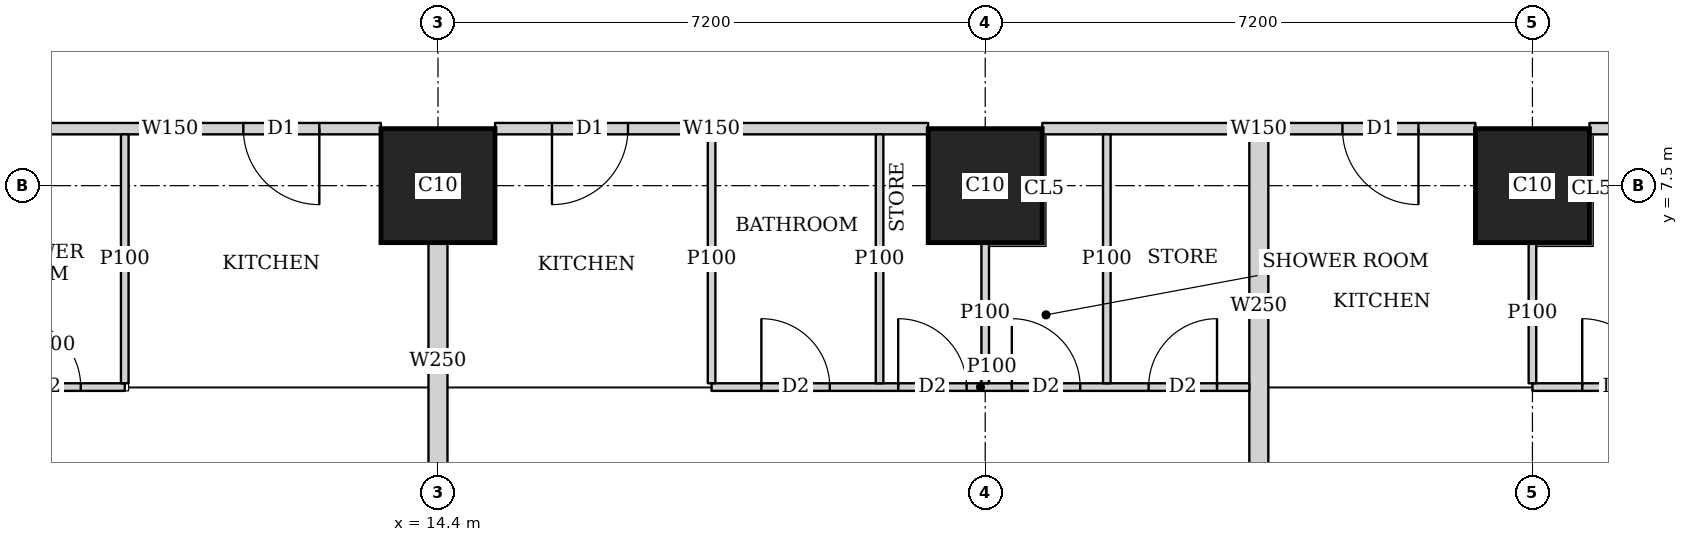
"""IFC4 building model, lengths in metres.
Left out: names, types, materials, properties, quantities, classifications, styles, units other than length and angle.
Written with IfcOpenShell. Run it as: python <this file> out.ifc"""

import sys

from ifc_helpers import new_model, si_unit, direction, frame, frame_2d, origin, origin_2d, place, context, subcontext, project, spatial, rectangle, extrude, element, fill, save


model = new_model("IFC4")
c1 = context("Model", 3, precision=1e-05, world=origin(), true_north=direction((0.0, 1.0)))
c2 = subcontext(c1, "Body", "Model", "MODEL_VIEW")
j1 = project(units=[si_unit("LENGTHUNIT", "METRE"), si_unit("PLANEANGLEUNIT", "RADIAN")], contexts=[c1])
p1 = place(None, origin())
s1 = spatial("IfcSite", under=j1, at=p1, CompositionType="ELEMENT")
p2 = place(p1, origin())
s2 = spatial("IfcBuilding", under=s1, at=p2, CompositionType="ELEMENT")
p3 = place(p2, frame((0.0, 0.0, 147.05)))
s3 = spatial("IfcBuildingStorey", under=s2, at=p3, CompositionType="ELEMENT", Elevation=147.05)
for number, where, z_axis, x_axis in (
    (1, (14.4, 7.5, 0.0), (0.0, 0.0, 1.0), (1.0, 0.0, 0.0)),
    (2, (21.6, 7.5, 0.0), (0.0, 0.0, 1.0), (1.0, 0.0, 0.0)),
    (3, (28.8, 7.5, 0.0), (0.0, 0.0, 1.0), (1.0, 0.0, 0.0)),
):
    element("IfcColumn", number, at=place(p3, frame(where, z_axis=z_axis, x_axis=x_axis)), inside=s3, PredefinedType="COLUMN", context=c2, shape_type="SweptSolid", body=[
        extrude(rectangle(XDim=1.5, YDim=1.5, at=origin_2d()), origin(), (0.0, 0.0, 1.0), 3.75),
    ])
p4 = place(p3, frame((35.249, 8.25, 0.0), z_axis=(0.0, 0.0, 1.0), x_axis=(-1.0, 0.0, 0.0)))
e4 = element("IfcWall", 4, at=p4, inside=s3, PredefinedType="SOLIDWALL", context=c2, shape_type="SweptSolid", body=[
    extrude(rectangle(XDim=5.698, YDim=0.15, at=frame_2d((2.849, 0.0))), origin(), (0.0, 0.0, 1.0), 3.5),
])
p5 = place(p3, frame((28.049, 8.25, 0.0), z_axis=(0.0, 0.0, 1.0), x_axis=(-1.0, 0.0, 0.0)))
e5 = element("IfcWall", 5, at=p5, inside=s3, PredefinedType="SOLIDWALL", context=c2, shape_type="SweptSolid", body=[
    extrude(rectangle(XDim=5.698, YDim=0.15, at=frame_2d((2.849, 0.0))), origin(), (0.0, 0.0, 1.0), 3.5),
])
p6 = place(p5, frame((0.749, 0.0, 0.0)))
e6 = element("IfcOpeningElement", 6, at=p6, cuts=e5, PredefinedType="OPENING", context=c2, shape_type="SweptSolid", body=[
    extrude(rectangle(XDim=1.0, YDim=2.1, at=frame_2d((0.5, 1.05))), frame((0.0, 0.085, 0.0), z_axis=(0.0, -1.0, 0.0), x_axis=(1.0, 0.0, 0.0)), (0.0, 0.0, 1.0), 0.17),
])
p7 = place(p3, frame((20.849, 8.25, 0.0), z_axis=(0.0, 0.0, 1.0), x_axis=(-1.0, 0.0, 0.0)))
e7 = element("IfcWall", 7, at=p7, inside=s3, PredefinedType="SOLIDWALL", context=c2, shape_type="SweptSolid", body=[
    extrude(rectangle(XDim=5.698, YDim=0.15, at=frame_2d((2.849, 0.0))), origin(), (0.0, 0.0, 1.0), 3.5),
])
p8 = place(p7, frame((3.949, 0.0, 0.0)))
e8 = element("IfcOpeningElement", 8, at=p8, cuts=e7, PredefinedType="OPENING", context=c2, shape_type="SweptSolid", body=[
    extrude(rectangle(XDim=1.0, YDim=2.1, at=frame_2d((0.5, 1.05))), frame((0.0, 0.085, 0.0), z_axis=(0.0, -1.0, 0.0), x_axis=(1.0, 0.0, 0.0)), (0.0, 0.0, 1.0), 0.17),
])
p9 = place(p3, frame((13.649, 8.25, 0.0), z_axis=(0.0, 0.0, 1.0), x_axis=(-1.0, 0.0, 0.0)))
e9 = element("IfcWall", 9, at=p9, inside=s3, PredefinedType="SOLIDWALL", context=c2, shape_type="SweptSolid", body=[
    extrude(rectangle(XDim=5.549, YDim=0.15, at=frame_2d((2.774, 0.0))), origin(), (0.0, 0.0, 1.0), 3.5),
])
p10 = place(p9, frame((0.81, 0.0, 0.0)))
e10 = element("IfcOpeningElement", 10, at=p10, cuts=e9, PredefinedType="OPENING", context=c2, shape_type="SweptSolid", body=[
    extrude(rectangle(XDim=1.0, YDim=2.1, at=frame_2d((0.5, 1.05))), frame((0.0, 0.085, 0.0), z_axis=(0.0, -1.0, 0.0), x_axis=(1.0, 0.0, 0.0)), (0.0, 0.0, 1.0), 0.17),
])
p11 = place(p3, frame((10.279, 4.85, 0.0), z_axis=(0.0, 0.0, 1.0), x_axis=(-1.0, 0.0, 0.0)))
e11 = element("IfcWall", 11, at=p11, inside=s3, PredefinedType="PARTITIONING", context=c2, shape_type="SweptSolid", body=[
    extrude(rectangle(XDim=1.954, YDim=0.1, at=frame_2d((0.977, 0.0))), origin(), (0.0, 0.0, 1.0), 3.5),
])
p12 = place(p11, frame((0.579, 0.0, 0.0)))
e12 = element("IfcOpeningElement", 12, at=p12, cuts=e11, PredefinedType="OPENING", context=c2, shape_type="SweptSolid", body=[
    extrude(rectangle(XDim=0.9, YDim=2.1, at=frame_2d((0.45, 1.05))), frame((0.0, 0.06, 0.0), z_axis=(0.0, -1.0, 0.0), x_axis=(1.0, 0.0, 0.0)), (0.0, 0.0, 1.0), 0.12),
])
p13 = place(p3, frame((10.279, 4.9, 0.0), z_axis=(0.0, 0.0, 1.0), x_axis=(0.0, 1.0, 0.0)))
e13 = element("IfcWall", 13, at=p13, inside=s3, PredefinedType="PARTITIONING", context=c2, shape_type="SweptSolid", body=[
    extrude(rectangle(XDim=3.275, YDim=0.1, at=frame_2d((1.638, 0.0))), origin(), (0.0, 0.0, 1.0), 3.5),
])
p14 = place(p3, frame((25.075, 4.85, 0.0), z_axis=(0.0, 0.0, 1.0), x_axis=(-1.0, 0.0, 0.0)))
e14 = element("IfcWall", 14, at=p14, inside=s3, PredefinedType="PARTITIONING", context=c2, shape_type="SweptSolid", body=[
    extrude(rectangle(XDim=7.075, YDim=0.1, at=frame_2d((3.538, 0.0))), origin(), (0.0, 0.0, 1.0), 3.5),
])
p15 = place(p14, frame((5.52, 0.0, 0.0)))
e15 = element("IfcOpeningElement", 15, at=p15, cuts=e14, PredefinedType="OPENING", context=c2, shape_type="SweptSolid", body=[
    extrude(rectangle(XDim=0.9, YDim=2.1, at=frame_2d((0.45, 1.05))), frame((0.0, 0.06, 0.0), z_axis=(0.0, -1.0, 0.0), x_axis=(1.0, 0.0, 0.0)), (0.0, 0.0, 1.0), 0.12),
])
p16 = place(p14, frame((2.225, 0.0, 0.0)))
e16 = element("IfcOpeningElement", 16, at=p16, cuts=e14, PredefinedType="OPENING", context=c2, shape_type="SweptSolid", body=[
    extrude(rectangle(XDim=0.9, YDim=2.1, at=frame_2d((0.45, 1.05))), frame((0.0, 0.06, 0.0), z_axis=(0.0, -1.0, 0.0), x_axis=(1.0, 0.0, 0.0)), (0.0, 0.0, 1.0), 0.12),
])
p17 = place(p14, frame((3.72, 0.0, 0.0)))
e17 = element("IfcOpeningElement", 17, at=p17, cuts=e14, PredefinedType="OPENING", context=c2, shape_type="SweptSolid", body=[
    extrude(rectangle(XDim=0.9, YDim=2.1, at=frame_2d((0.45, 1.05))), frame((0.0, 0.06, 0.0), z_axis=(0.0, -1.0, 0.0), x_axis=(1.0, 0.0, 0.0)), (0.0, 0.0, 1.0), 0.12),
])
p18 = place(p14, frame((0.425, 0.0, 0.0)))
e18 = element("IfcOpeningElement", 18, at=p18, cuts=e14, PredefinedType="OPENING", context=c2, shape_type="SweptSolid", body=[
    extrude(rectangle(XDim=0.9, YDim=2.1, at=frame_2d((0.45, 1.05))), frame((0.0, 0.06, 0.0), z_axis=(0.0, -1.0, 0.0), x_axis=(1.0, 0.0, 0.0)), (0.0, 0.0, 1.0), 0.12),
])
p19 = place(p3, frame((18.0, 4.9, 0.0), z_axis=(0.0, 0.0, 1.0), x_axis=(0.0, 1.0, 0.0)))
e19 = element("IfcWall", 19, at=p19, inside=s3, PredefinedType="PARTITIONING", context=c2, shape_type="SweptSolid", body=[
    extrude(rectangle(XDim=3.275, YDim=0.1, at=frame_2d((1.638, 0.0))), origin(), (0.0, 0.0, 1.0), 3.5),
])
p20 = place(p3, frame((21.6, 4.9, 0.0), z_axis=(0.0, 0.0, 1.0), x_axis=(0.0, 1.0, 0.0)))
e20 = element("IfcWall", 20, at=p20, inside=s3, PredefinedType="PARTITIONING", context=c2, shape_type="SweptSolid", body=[
    extrude(rectangle(XDim=1.849, YDim=0.1, at=frame_2d((0.925, 0.0))), origin(), (0.0, 0.0, 1.0), 3.5),
])
for number, where, z_axis, x_axis in (
    (21, (20.21, 4.9, 0.0), (0.0, 0.0, 1.0), (0.0, 1.0, 0.0)),
    (22, (23.2, 4.9, 0.0), (0.0, 0.0, 1.0), (0.0, 1.0, 0.0)),
):
    element("IfcWall", number, at=place(p3, frame(where, z_axis=z_axis, x_axis=x_axis)), inside=s3, PredefinedType="PARTITIONING", context=c2, shape_type="SweptSolid", body=[
        extrude(rectangle(XDim=3.275, YDim=0.1, at=frame_2d((1.638, 0.0))), origin(), (0.0, 0.0, 1.0), 3.5),
    ])
p21 = place(p3, frame((14.4, 3.65, 0.0), z_axis=(0.0, 0.0, 1.0), x_axis=(0.0, 1.0, 0.0)))
e23 = element("IfcWall", 23, at=p21, inside=s3, PredefinedType="SOLIDWALL", context=c2, shape_type="SweptSolid", body=[
    extrude(rectangle(XDim=3.099, YDim=0.25, at=frame_2d((1.55, 0.0))), origin(), (0.0, 0.0, 1.0), 3.5),
])
p22 = place(p3, frame((41.002, 4.85, 0.0), z_axis=(0.0, 0.0, 1.0), x_axis=(-1.0, 0.0, 0.0)))
e24 = element("IfcWall", 24, at=p22, inside=s3, PredefinedType="PARTITIONING", context=c2, shape_type="SweptSolid", body=[
    extrude(rectangle(XDim=12.202, YDim=0.1, at=frame_2d((6.101, 0.0))), origin(), (0.0, 0.0, 1.0), 3.5),
])
p23 = place(p22, frame((10.647, 0.0, 0.0)))
e25 = element("IfcOpeningElement", 25, at=p23, cuts=e24, PredefinedType="OPENING", context=c2, shape_type="SweptSolid", body=[
    extrude(rectangle(XDim=0.9, YDim=2.1, at=frame_2d((0.45, 1.05))), frame((0.0, 0.06, 0.0), z_axis=(0.0, -1.0, 0.0), x_axis=(1.0, 0.0, 0.0)), (0.0, 0.0, 1.0), 0.12),
])
p24 = place(p22, frame((7.352, 0.0, 0.0)))
e26 = element("IfcOpeningElement", 26, at=p24, cuts=e24, PredefinedType="OPENING", context=c2, shape_type="SweptSolid", body=[
    extrude(rectangle(XDim=0.9, YDim=2.1, at=frame_2d((0.45, 1.05))), frame((0.0, 0.06, 0.0), z_axis=(0.0, -1.0, 0.0), x_axis=(1.0, 0.0, 0.0)), (0.0, 0.0, 1.0), 0.12),
])
p25 = place(p22, frame((3.642, 0.0, 0.0)))
e27 = element("IfcOpeningElement", 27, at=p25, cuts=e24, PredefinedType="OPENING", context=c2, shape_type="SweptSolid", body=[
    extrude(rectangle(XDim=0.9, YDim=2.1, at=frame_2d((0.45, 1.05))), frame((0.0, 0.06, 0.0), z_axis=(0.0, -1.0, 0.0), x_axis=(1.0, 0.0, 0.0)), (0.0, 0.0, 1.0), 0.12),
])
p26 = place(p22, frame((0.15, 0.0, 0.0)))
e28 = element("IfcOpeningElement", 28, at=p26, cuts=e24, PredefinedType="OPENING", context=c2, shape_type="SweptSolid", body=[
    extrude(rectangle(XDim=0.9, YDim=2.1, at=frame_2d((0.45, 1.05))), frame((0.0, 0.06, 0.0), z_axis=(0.0, -1.0, 0.0), x_axis=(1.0, 0.0, 0.0)), (0.0, 0.0, 1.0), 0.12),
])
p27 = place(p22, frame((8.847, 0.0, 0.0)))
e29 = element("IfcOpeningElement", 29, at=p27, cuts=e24, PredefinedType="OPENING", context=c2, shape_type="SweptSolid", body=[
    extrude(rectangle(XDim=0.9, YDim=2.1, at=frame_2d((0.45, 1.05))), frame((0.0, 0.06, 0.0), z_axis=(0.0, -1.0, 0.0), x_axis=(1.0, 0.0, 0.0)), (0.0, 0.0, 1.0), 0.12),
])
p28 = place(p22, frame((5.552, 0.0, 0.0)))
e30 = element("IfcOpeningElement", 30, at=p28, cuts=e24, PredefinedType="OPENING", context=c2, shape_type="SweptSolid", body=[
    extrude(rectangle(XDim=0.9, YDim=2.1, at=frame_2d((0.45, 1.05))), frame((0.0, 0.06, 0.0), z_axis=(0.0, -1.0, 0.0), x_axis=(1.0, 0.0, 0.0)), (0.0, 0.0, 1.0), 0.12),
])
p29 = place(p22, frame((1.842, 0.0, 0.0)))
e31 = element("IfcOpeningElement", 31, at=p29, cuts=e24, PredefinedType="OPENING", context=c2, shape_type="SweptSolid", body=[
    extrude(rectangle(XDim=0.9, YDim=2.1, at=frame_2d((0.45, 1.05))), frame((0.0, 0.06, 0.0), z_axis=(0.0, -1.0, 0.0), x_axis=(1.0, 0.0, 0.0)), (0.0, 0.0, 1.0), 0.12),
])
p30 = place(p3, frame((28.8, 4.9, 0.0), z_axis=(0.0, 0.0, 1.0), x_axis=(0.0, 1.0, 0.0)))
e32 = element("IfcWall", 32, at=p30, inside=s3, PredefinedType="PARTITIONING", context=c2, shape_type="SweptSolid", body=[
    extrude(rectangle(XDim=1.849, YDim=0.1, at=frame_2d((0.925, 0.0))), origin(), (0.0, 0.0, 1.0), 3.5),
])
p31 = place(p3, frame((25.2, 3.65, 0.0), z_axis=(0.0, 0.0, 1.0), x_axis=(0.0, 1.0, 0.0)))
e33 = element("IfcWall", 33, at=p31, inside=s3, PredefinedType="SOLIDWALL", context=c2, shape_type="SweptSolid", body=[
    extrude(rectangle(XDim=4.525, YDim=0.25, at=frame_2d((2.263, 0.0))), origin(), (0.0, 0.0, 1.0), 3.5),
])
p32 = place(p12, origin())
e34 = element("IfcDoor", 34, at=p32, inside=s3, OperationType="SINGLE_SWING_LEFT", PredefinedType="DOOR", context=c2, shape_type="SweptSolid", body=[
    extrude(rectangle(XDim=0.9, YDim=2.1, at=frame_2d((0.45, 1.05))), frame((0.0, 0.025, 0.0), z_axis=(0.0, -1.0, 0.0), x_axis=(1.0, 0.0, 0.0)), (0.0, 0.0, 1.0), 0.05),
])
fill(e12, e34)
p33 = place(p10, origin())
e35 = element("IfcDoor", 35, at=p33, inside=s3, OperationType="SINGLE_SWING_LEFT", PredefinedType="DOOR", context=c2, shape_type="SweptSolid", body=[
    extrude(rectangle(XDim=1.0, YDim=2.1, at=frame_2d((0.5, 1.05))), frame((0.0, 0.025, 0.0), z_axis=(0.0, -1.0, 0.0), x_axis=(1.0, 0.0, 0.0)), (0.0, 0.0, 1.0), 0.05),
])
fill(e10, e35)
p34 = place(p15, origin())
e36 = element("IfcDoor", 36, at=p34, inside=s3, OperationType="SINGLE_SWING_LEFT", PredefinedType="DOOR", context=c2, shape_type="SweptSolid", body=[
    extrude(rectangle(XDim=0.9, YDim=2.1, at=frame_2d((0.45, 1.05))), frame((0.0, 0.025, 0.0), z_axis=(0.0, -1.0, 0.0), x_axis=(1.0, 0.0, 0.0)), (0.0, 0.0, 1.0), 0.05),
])
fill(e15, e36)
p35 = place(p16, origin())
e37 = element("IfcDoor", 37, at=p35, inside=s3, OperationType="SINGLE_SWING_LEFT", PredefinedType="DOOR", context=c2, shape_type="SweptSolid", body=[
    extrude(rectangle(XDim=0.9, YDim=2.1, at=frame_2d((0.45, 1.05))), frame((0.0, 0.025, 0.0), z_axis=(0.0, -1.0, 0.0), x_axis=(1.0, 0.0, 0.0)), (0.0, 0.0, 1.0), 0.05),
])
fill(e16, e37)
p36 = place(p17, origin())
e38 = element("IfcDoor", 38, at=p36, inside=s3, OperationType="SINGLE_SWING_LEFT", PredefinedType="DOOR", context=c2, shape_type="SweptSolid", body=[
    extrude(rectangle(XDim=0.9, YDim=2.1, at=frame_2d((0.45, 1.05))), frame((0.0, 0.025, 0.0), z_axis=(0.0, -1.0, 0.0), x_axis=(1.0, 0.0, 0.0)), (0.0, 0.0, 1.0), 0.05),
])
fill(e17, e38)
p37 = place(p18, origin())
e39 = element("IfcDoor", 39, at=p37, inside=s3, OperationType="SINGLE_SWING_RIGHT", PredefinedType="DOOR", context=c2, shape_type="SweptSolid", body=[
    extrude(rectangle(XDim=0.9, YDim=2.1, at=frame_2d((0.45, 1.05))), frame((0.0, 0.025, 0.0), z_axis=(0.0, -1.0, 0.0), x_axis=(1.0, 0.0, 0.0)), (0.0, 0.0, 1.0), 0.05),
])
fill(e18, e39)
p38 = place(p8, origin())
e40 = element("IfcDoor", 40, at=p38, inside=s3, OperationType="SINGLE_SWING_RIGHT", PredefinedType="DOOR", context=c2, shape_type="SweptSolid", body=[
    extrude(rectangle(XDim=1.0, YDim=2.1, at=frame_2d((0.5, 1.05))), frame((0.0, 0.025, 0.0), z_axis=(0.0, -1.0, 0.0), x_axis=(1.0, 0.0, 0.0)), (0.0, 0.0, 1.0), 0.05),
])
fill(e8, e40)
p39 = place(p23, origin())
e41 = element("IfcDoor", 41, at=p39, inside=s3, OperationType="SINGLE_SWING_LEFT", PredefinedType="DOOR", context=c2, shape_type="SweptSolid", body=[
    extrude(rectangle(XDim=0.9, YDim=2.1, at=frame_2d((0.45, 1.05))), frame((0.0, 0.025, 0.0), z_axis=(0.0, -1.0, 0.0), x_axis=(1.0, 0.0, 0.0)), (0.0, 0.0, 1.0), 0.05),
])
fill(e25, e41)
p40 = place(p6, origin())
e42 = element("IfcDoor", 42, at=p40, inside=s3, OperationType="SINGLE_SWING_LEFT", PredefinedType="DOOR", context=c2, shape_type="SweptSolid", body=[
    extrude(rectangle(XDim=1.0, YDim=2.1, at=frame_2d((0.5, 1.05))), frame((0.0, 0.025, 0.0), z_axis=(0.0, -1.0, 0.0), x_axis=(1.0, 0.0, 0.0)), (0.0, 0.0, 1.0), 0.05),
])
fill(e6, e42)
save(model, sys.argv[1])
